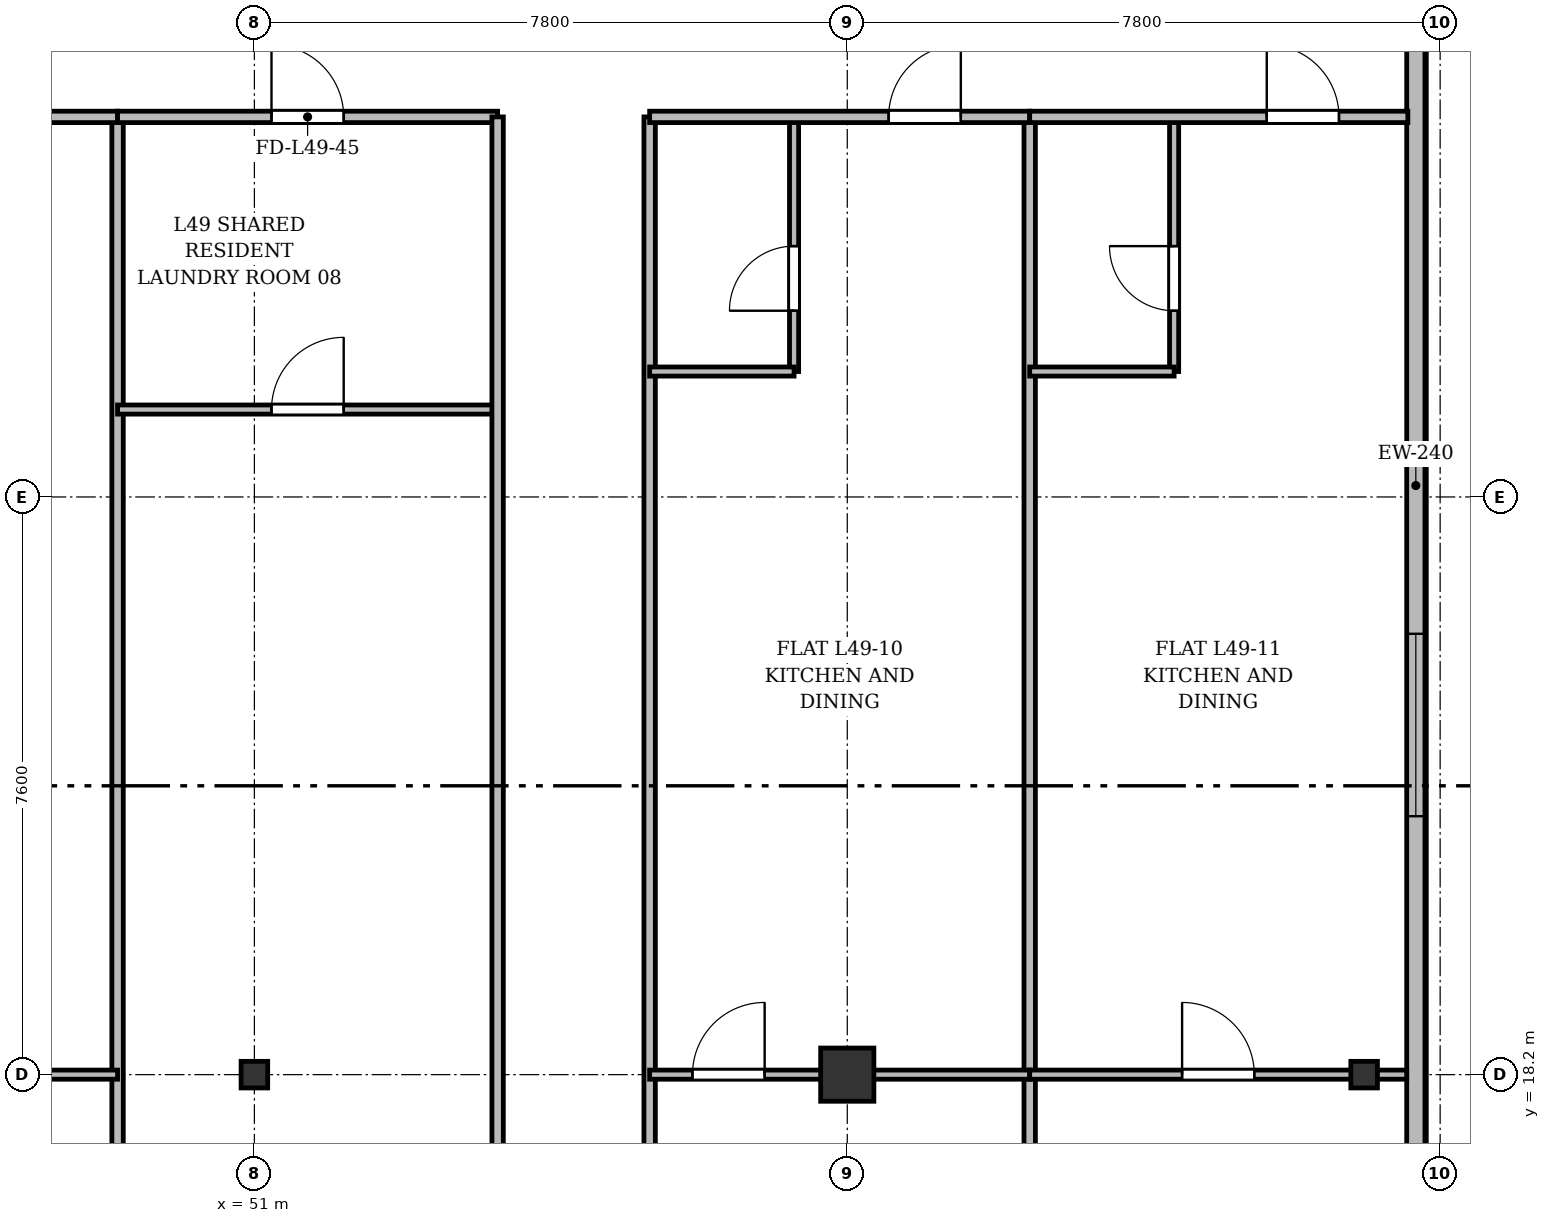
"""IFC4 building model, lengths in metres.
Left out: names, types, materials, properties, quantities, classifications, styles, units other than length and angle.
Written with IfcOpenShell. Run it as: python <this file> out.ifc"""

import sys

from ifc_helpers import new_model, si_unit, direction, frame, frame_2d, origin, origin_2d, place, context, subcontext, project, spatial, rectangle, i_section, extrude, source, transform, mapped, element, fill, save


model = new_model("IFC4")
c1 = context("Model", 3, precision=1e-05, world=origin(), true_north=direction((0.0, 1.0)))
c2 = subcontext(c1, "Body", "Model", "MODEL_VIEW")
j1 = project(units=[si_unit("LENGTHUNIT", "METRE"), si_unit("PLANEANGLEUNIT", "RADIAN")], contexts=[c1])
p1 = place(None, origin())
s1 = spatial("IfcSite", under=j1, at=p1, CompositionType="ELEMENT")
p2 = place(p1, origin())
s2 = spatial("IfcBuilding", under=s1, at=p2, CompositionType="ELEMENT")
p3 = place(p2, frame((0.0, 0.0, 190.5)))
s3 = spatial("IfcBuildingStorey", under=s2, at=p3, CompositionType="ELEMENT", Elevation=190.5)
m1 = source(origin(), c2, "Body", "SweptSolid", [
    extrude(i_section(OverallWidth=0.35, OverallDepth=0.35, WebThickness=0.018, FlangeThickness=0.028, at=origin_2d()), origin(), (0.0, 0.0, 1.0), 3.6),
])
p4 = place(p3, frame((51.0, 18.2, 0.0), z_axis=(0.0, 0.0, 1.0), x_axis=(1.0, 0.0, 0.0)))
e1 = element("IfcColumn", 1, at=p4, inside=s3, PredefinedType="COLUMN", context=c2, shape_type="MappedRepresentation", body=[
    mapped(m1, transform((0.0, 0.0, 0.0), x_axis=(1.0, 0.0, 0.0), y_axis=(0.0, 1.0, 0.0), z_axis=(0.0, 0.0, 1.0), scale=1.0)),
])
m2 = source(origin(), c2, "Body", "SweptSolid", [
    extrude(rectangle(XDim=0.7, YDim=0.7, at=origin_2d()), origin(), (0.0, 0.0, 1.0), 3.6),
])
p5 = place(p3, frame((58.8, 18.2, 0.0), z_axis=(0.0, 0.0, 1.0), x_axis=(1.0, 0.0, 0.0)))
e2 = element("IfcColumn", 2, at=p5, inside=s3, PredefinedType="COLUMN", context=c2, shape_type="MappedRepresentation", body=[
    mapped(m2, transform((0.0, 0.0, 0.0), x_axis=(1.0, 0.0, 0.0), y_axis=(0.0, 1.0, 0.0), z_axis=(0.0, 0.0, 1.0), scale=1.0)),
])
p6 = place(p3, frame((65.6, 18.2, 0.0), z_axis=(0.0, 0.0, 1.0), x_axis=(1.0, 0.0, 0.0)))
e3 = element("IfcColumn", 3, at=p6, inside=s3, PredefinedType="COLUMN", context=c2, shape_type="MappedRepresentation", body=[
    mapped(m1, transform((0.0, 0.0, 0.0), x_axis=(1.0, 0.0, 0.0), y_axis=(0.0, 1.0, 0.0), z_axis=(0.0, 0.0, 1.0), scale=1.0)),
])
p7 = place(p3, frame((66.28, 45.5, 0.0), z_axis=(0.0, 0.0, 1.0), x_axis=(0.0, -1.0, 0.0)))
e4 = element("IfcWall", 4, at=p7, inside=s3, PredefinedType="SOLIDWALL", context=c2, shape_type="SweptSolid", body=[
    extrude(rectangle(XDim=39.1, YDim=0.24, at=frame_2d((19.55, 0.0))), origin(), (0.0, 0.0, 1.0), 3.36),
])
p8 = place(p7, frame((36.45, 0.0, 0.92)))
e5 = element("IfcOpeningElement", 5, at=p8, cuts=e4, PredefinedType="OPENING", context=c2, shape_type="SweptSolid", body=[
    extrude(rectangle(XDim=1.2, YDim=1.65, at=frame_2d((0.6, 0.825))), frame((0.0, 0.13, 0.0), z_axis=(0.0, -1.0, 0.0), x_axis=(1.0, 0.0, 0.0)), (0.0, 0.0, 1.0), 0.26),
])
p9 = place(p7, frame((32.9, 0.0, 0.92)))
e6 = element("IfcOpeningElement", 6, at=p9, cuts=e4, PredefinedType="OPENING", context=c2, shape_type="SweptSolid", body=[
    extrude(rectangle(XDim=2.4, YDim=2.1, at=frame_2d((1.2, 1.05))), frame((0.0, 0.13, 0.0), z_axis=(0.0, -1.0, 0.0), x_axis=(1.0, 0.0, 0.0)), (0.0, 0.0, 1.0), 0.26),
])
p10 = place(p7, frame((28.7, 0.0, 0.92)))
e7 = element("IfcOpeningElement", 7, at=p10, cuts=e4, PredefinedType="OPENING", context=c2, shape_type="SweptSolid", body=[
    extrude(rectangle(XDim=2.4, YDim=2.1, at=frame_2d((1.2, 1.05))), frame((0.0, 0.13, 0.0), z_axis=(0.0, -1.0, 0.0), x_axis=(1.0, 0.0, 0.0)), (0.0, 0.0, 1.0), 0.26),
])
p11 = place(p7, frame((21.5, 0.0, 0.92)))
e8 = element("IfcOpeningElement", 8, at=p11, cuts=e4, PredefinedType="OPENING", context=c2, shape_type="SweptSolid", body=[
    extrude(rectangle(XDim=2.4, YDim=2.1, at=frame_2d((1.2, 1.05))), frame((0.0, 0.13, 0.0), z_axis=(0.0, -1.0, 0.0), x_axis=(1.0, 0.0, 0.0)), (0.0, 0.0, 1.0), 0.26),
])
p12 = place(p7, frame((7.5, 0.0, 0.92)))
e9 = element("IfcOpeningElement", 9, at=p12, cuts=e4, PredefinedType="OPENING", context=c2, shape_type="SweptSolid", body=[
    extrude(rectangle(XDim=2.4, YDim=2.1, at=frame_2d((1.2, 1.05))), frame((0.0, 0.13, 0.0), z_axis=(0.0, -1.0, 0.0), x_axis=(1.0, 0.0, 0.0)), (0.0, 0.0, 1.0), 0.26),
])
p13 = place(p7, frame((4.5, 0.0, 0.92)))
e10 = element("IfcOpeningElement", 10, at=p13, cuts=e4, PredefinedType="OPENING", context=c2, shape_type="SweptSolid", body=[
    extrude(rectangle(XDim=1.2, YDim=1.65, at=frame_2d((0.6, 0.825))), frame((0.0, 0.13, 0.0), z_axis=(0.0, -1.0, 0.0), x_axis=(1.0, 0.0, 0.0)), (0.0, 0.0, 1.0), 0.26),
])
p14 = place(p7, frame((1.15, 0.0, 0.92)))
e11 = element("IfcOpeningElement", 11, at=p14, cuts=e4, PredefinedType="OPENING", context=c2, shape_type="SweptSolid", body=[
    extrude(rectangle(XDim=1.2, YDim=1.65, at=frame_2d((0.6, 0.825))), frame((0.0, 0.13, 0.0), z_axis=(0.0, -1.0, 0.0), x_axis=(1.0, 0.0, 0.0)), (0.0, 0.0, 1.0), 0.26),
])
for number, where, z_axis, x_axis in (
    (12, (49.2, 3.625, 0.0), (0.0, 0.0, 1.0), (0.0, 1.0, 0.0)),
    (13, (61.2, 3.625, 0.0), (0.0, 0.0, 1.0), (0.0, 1.0, 0.0)),
):
    element("IfcWall", number, at=place(p3, frame(where, z_axis=z_axis, x_axis=x_axis)), inside=s3, PredefinedType="PARTITIONING", context=c2, shape_type="SweptSolid", body=[
        extrude(rectangle(XDim=27.175, YDim=0.15, at=frame_2d((13.587, 0.0))), origin(), (0.0, 0.0, 1.0), 2.91),
    ])
p15 = place(p3, frame((44.0, 30.8, 0.0), z_axis=(0.0, 0.0, 1.0), x_axis=(1.0, 0.0, 0.0)))
e14 = element("IfcWall", 14, at=p15, inside=s3, PredefinedType="PARTITIONING", context=c2, shape_type="SweptSolid", body=[
    extrude(rectangle(XDim=5.2, YDim=0.15, at=frame_2d((2.6, 0.0))), origin(), (0.0, 0.0, 1.0), 3.36),
])
p16 = place(p15, frame((2.033, 0.0, 0.0)))
e15 = element("IfcOpeningElement", 15, at=p16, cuts=e14, PredefinedType="OPENING", context=c2, shape_type="SweptSolid", body=[
    extrude(rectangle(XDim=0.95, YDim=2.15, at=frame_2d((0.475, 1.075))), frame((0.0, 0.085, 0.0), z_axis=(0.0, -1.0, 0.0), x_axis=(1.0, 0.0, 0.0)), (0.0, 0.0, 1.0), 0.17),
])
p17 = place(p3, frame((44.025, 18.2, 0.0), z_axis=(0.0, 0.0, 1.0), x_axis=(1.0, 0.0, 0.0)))
e16 = element("IfcWall", 16, at=p17, inside=s3, PredefinedType="PARTITIONING", context=c2, shape_type="SweptSolid", body=[
    extrude(rectangle(XDim=5.175, YDim=0.12, at=frame_2d((2.587, 0.0))), origin(), (0.0, 0.0, 1.0), 2.91),
])
p18 = place(p17, frame((2.021, 0.0, 0.0)))
e17 = element("IfcOpeningElement", 17, at=p18, cuts=e16, PredefinedType="OPENING", context=c2, shape_type="SweptSolid", body=[
    extrude(rectangle(XDim=0.95, YDim=2.15, at=frame_2d((0.475, 1.075))), frame((0.0, 0.07, 0.0), z_axis=(0.0, -1.0, 0.0), x_axis=(1.0, 0.0, 0.0)), (0.0, 0.0, 1.0), 0.14),
])
p19 = place(p3, frame((49.2, 30.8, 0.0), z_axis=(0.0, 0.0, 1.0), x_axis=(1.0, 0.0, 0.0)))
e18 = element("IfcWall", 18, at=p19, inside=s3, PredefinedType="PARTITIONING", context=c2, shape_type="SweptSolid", body=[
    extrude(rectangle(XDim=5.0, YDim=0.15, at=frame_2d((2.5, 0.0))), origin(), (0.0, 0.0, 1.0), 2.86),
])
p20 = place(p19, frame((2.025, 0.0, 0.0)))
e19 = element("IfcOpeningElement", 19, at=p20, cuts=e18, PredefinedType="OPENING", context=c2, shape_type="SweptSolid", body=[
    extrude(rectangle(XDim=0.95, YDim=2.15, at=frame_2d((0.475, 1.075))), frame((0.0, 0.085, 0.0), z_axis=(0.0, -1.0, 0.0), x_axis=(1.0, 0.0, 0.0)), (0.0, 0.0, 1.0), 0.17),
])
p21 = place(p3, frame((49.2, 26.95, 0.0), z_axis=(0.0, 0.0, 1.0), x_axis=(1.0, 0.0, 0.0)))
e20 = element("IfcWall", 20, at=p21, inside=s3, PredefinedType="PARTITIONING", context=c2, shape_type="SweptSolid", body=[
    extrude(rectangle(XDim=5.0, YDim=0.12, at=frame_2d((2.5, 0.0))), origin(), (0.0, 0.0, 1.0), 2.86),
])
p22 = place(p21, frame((2.025, 0.0, 0.0)))
e21 = element("IfcOpeningElement", 21, at=p22, cuts=e20, PredefinedType="OPENING", context=c2, shape_type="SweptSolid", body=[
    extrude(rectangle(XDim=0.95, YDim=2.15, at=frame_2d((0.475, 1.075))), frame((0.0, 0.07, 0.0), z_axis=(0.0, -1.0, 0.0), x_axis=(1.0, 0.0, 0.0)), (0.0, 0.0, 1.0), 0.14),
])
for number, where, z_axis, x_axis in (
    (22, (54.2, 3.625, 0.0), (0.0, 0.0, 1.0), (0.0, 1.0, 0.0)),
    (23, (56.2, 3.625, 0.0), (0.0, 0.0, 1.0), (0.0, 1.0, 0.0)),
):
    element("IfcWall", number, at=place(p3, frame(where, z_axis=z_axis, x_axis=x_axis)), inside=s3, PredefinedType="PARTITIONING", context=c2, shape_type="SweptSolid", body=[
        extrude(rectangle(XDim=27.175, YDim=0.15, at=frame_2d((13.587, 0.0))), origin(), (0.0, 0.0, 1.0), 2.91),
    ])
p23 = place(p3, frame((56.2, 18.2, 0.0), z_axis=(0.0, 0.0, 1.0), x_axis=(1.0, 0.0, 0.0)))
e24 = element("IfcWall", 24, at=p23, inside=s3, PredefinedType="PARTITIONING", context=c2, shape_type="SweptSolid", body=[
    extrude(rectangle(XDim=5.0, YDim=0.12, at=frame_2d((2.5, 0.0))), origin(), (0.0, 0.0, 1.0), 2.91),
])
p24 = place(p23, frame((0.563, 0.0, 0.0)))
e25 = element("IfcOpeningElement", 25, at=p24, cuts=e24, PredefinedType="OPENING", context=c2, shape_type="SweptSolid", body=[
    extrude(rectangle(XDim=0.95, YDim=2.15, at=frame_2d((0.475, 1.075))), frame((0.0, 0.07, 0.0), z_axis=(0.0, -1.0, 0.0), x_axis=(1.0, 0.0, 0.0)), (0.0, 0.0, 1.0), 0.14),
])
p25 = place(p3, frame((58.1, 27.45, 0.0), z_axis=(0.0, 0.0, 1.0), x_axis=(0.0, 1.0, 0.0)))
e26 = element("IfcWall", 26, at=p25, inside=s3, PredefinedType="PARTITIONING", context=c2, shape_type="SweptSolid", body=[
    extrude(rectangle(XDim=3.35, YDim=0.12, at=frame_2d((1.675, 0.0))), origin(), (0.0, 0.0, 1.0), 3.36),
])
p26 = place(p25, frame((0.8, 0.0, 0.0)))
e27 = element("IfcOpeningElement", 27, at=p26, cuts=e26, PredefinedType="OPENING", context=c2, shape_type="SweptSolid", body=[
    extrude(rectangle(XDim=0.85, YDim=2.1, at=frame_2d((0.425, 1.05))), frame((0.0, 0.07, 0.0), z_axis=(0.0, -1.0, 0.0), x_axis=(1.0, 0.0, 0.0)), (0.0, 0.0, 1.0), 0.14),
])
p27 = place(p3, frame((56.2, 27.45, 0.0), z_axis=(0.0, 0.0, 1.0), x_axis=(1.0, 0.0, 0.0)))
e28 = element("IfcWall", 28, at=p27, inside=s3, PredefinedType="PARTITIONING", context=c2, shape_type="SweptSolid", body=[
    extrude(rectangle(XDim=1.9, YDim=0.12, at=frame_2d((0.95, 0.0))), origin(), (0.0, 0.0, 1.0), 3.36),
])
p28 = place(p3, frame((56.2, 30.8, 0.0), z_axis=(0.0, 0.0, 1.0), x_axis=(1.0, 0.0, 0.0)))
e29 = element("IfcWall", 29, at=p28, inside=s3, PredefinedType="PARTITIONING", context=c2, shape_type="SweptSolid", body=[
    extrude(rectangle(XDim=5.0, YDim=0.15, at=frame_2d((2.5, 0.0))), origin(), (0.0, 0.0, 1.0), 2.86),
])
p29 = place(p28, frame((3.144, 0.0, 0.0)))
e30 = element("IfcOpeningElement", 30, at=p29, cuts=e29, PredefinedType="OPENING", context=c2, shape_type="SweptSolid", body=[
    extrude(rectangle(XDim=0.95, YDim=2.15, at=frame_2d((0.475, 1.075))), frame((0.0, 0.085, 0.0), z_axis=(0.0, -1.0, 0.0), x_axis=(1.0, 0.0, 0.0)), (0.0, 0.0, 1.0), 0.17),
])
p30 = place(p3, frame((61.2, 18.2, 0.0), z_axis=(0.0, 0.0, 1.0), x_axis=(1.0, 0.0, 0.0)))
e31 = element("IfcWall", 31, at=p30, inside=s3, PredefinedType="PARTITIONING", context=c2, shape_type="SweptSolid", body=[
    extrude(rectangle(XDim=4.96, YDim=0.12, at=frame_2d((2.48, 0.0))), origin(), (0.0, 0.0, 1.0), 2.91),
])
p31 = place(p30, frame((2.005, 0.0, 0.0)))
e32 = element("IfcOpeningElement", 32, at=p31, cuts=e31, PredefinedType="OPENING", context=c2, shape_type="SweptSolid", body=[
    extrude(rectangle(XDim=0.95, YDim=2.15, at=frame_2d((0.475, 1.075))), frame((0.0, 0.07, 0.0), z_axis=(0.0, -1.0, 0.0), x_axis=(1.0, 0.0, 0.0)), (0.0, 0.0, 1.0), 0.14),
])
p32 = place(p3, frame((63.1, 27.45, 0.0), z_axis=(0.0, 0.0, 1.0), x_axis=(0.0, 1.0, 0.0)))
e33 = element("IfcWall", 33, at=p32, inside=s3, PredefinedType="PARTITIONING", context=c2, shape_type="SweptSolid", body=[
    extrude(rectangle(XDim=3.35, YDim=0.12, at=frame_2d((1.675, 0.0))), origin(), (0.0, 0.0, 1.0), 3.36),
])
p33 = place(p32, frame((0.8, 0.0, 0.0)))
e34 = element("IfcOpeningElement", 34, at=p33, cuts=e33, PredefinedType="OPENING", context=c2, shape_type="SweptSolid", body=[
    extrude(rectangle(XDim=0.85, YDim=2.1, at=frame_2d((0.425, 1.05))), frame((0.0, 0.07, 0.0), z_axis=(0.0, -1.0, 0.0), x_axis=(1.0, 0.0, 0.0)), (0.0, 0.0, 1.0), 0.14),
])
p34 = place(p3, frame((61.2, 27.45, 0.0), z_axis=(0.0, 0.0, 1.0), x_axis=(1.0, 0.0, 0.0)))
e35 = element("IfcWall", 35, at=p34, inside=s3, PredefinedType="PARTITIONING", context=c2, shape_type="SweptSolid", body=[
    extrude(rectangle(XDim=1.9, YDim=0.12, at=frame_2d((0.95, 0.0))), origin(), (0.0, 0.0, 1.0), 3.36),
])
p35 = place(p3, frame((61.2, 30.8, 0.0), z_axis=(0.0, 0.0, 1.0), x_axis=(1.0, 0.0, 0.0)))
e36 = element("IfcWall", 36, at=p35, inside=s3, PredefinedType="PARTITIONING", context=c2, shape_type="SweptSolid", body=[
    extrude(rectangle(XDim=4.975, YDim=0.15, at=frame_2d((2.488, 0.0))), origin(), (0.0, 0.0, 1.0), 2.86),
])
p36 = place(p35, frame((3.119, 0.0, 0.0)))
e37 = element("IfcOpeningElement", 37, at=p36, cuts=e36, PredefinedType="OPENING", context=c2, shape_type="SweptSolid", body=[
    extrude(rectangle(XDim=0.95, YDim=2.15, at=frame_2d((0.475, 1.075))), frame((0.0, 0.085, 0.0), z_axis=(0.0, -1.0, 0.0), x_axis=(1.0, 0.0, 0.0)), (0.0, 0.0, 1.0), 0.17),
])
m3 = source(origin(), c2, "Body", "SweptSolid", [
    extrude(rectangle(XDim=2.4, YDim=2.1, at=frame_2d((1.2, 1.05))), frame((0.0, 0.03, 0.0), z_axis=(0.0, -1.0, 0.0), x_axis=(1.0, 0.0, 0.0)), (0.0, 0.0, 1.0), 0.06),
])
p37 = place(p11, origin())
e38 = element("IfcWindow", 38, at=p37, inside=s3, PartitioningType="SINGLE_PANEL", PredefinedType="WINDOW", context=c2, shape_type="MappedRepresentation", body=[
    mapped(m3, transform((0.0, 0.0, 0.0), x_axis=(1.0, 0.0, 0.0), y_axis=(0.0, 1.0, 0.0), z_axis=(0.0, 0.0, 1.0), scale=1.0)),
])
fill(e8, e38)
m4 = source(origin(), c2, "Body", "SweptSolid", [
    extrude(rectangle(XDim=0.95, YDim=2.15, at=frame_2d((0.475, 1.075))), frame((0.0, 0.025, 0.0), z_axis=(0.0, -1.0, 0.0), x_axis=(1.0, 0.0, 0.0)), (0.0, 0.0, 1.0), 0.05),
])
p38 = place(p20, origin())
e39 = element("IfcDoor", 39, at=p38, inside=s3, OperationType="SINGLE_SWING_LEFT", PredefinedType="DOOR", context=c2, shape_type="MappedRepresentation", body=[
    mapped(m4, transform((0.0, 0.0, 0.0), x_axis=(1.0, 0.0, 0.0), y_axis=(0.0, 1.0, 0.0), z_axis=(0.0, 0.0, 1.0), scale=1.0)),
])
fill(e19, e39)
p39 = place(p22, origin())
e40 = element("IfcDoor", 40, at=p39, inside=s3, OperationType="SINGLE_SWING_RIGHT", PredefinedType="DOOR", context=c2, shape_type="MappedRepresentation", body=[
    mapped(m4, transform((0.0, 0.0, 0.0), x_axis=(1.0, 0.0, 0.0), y_axis=(0.0, 1.0, 0.0), z_axis=(0.0, 0.0, 1.0), scale=1.0)),
])
fill(e21, e40)
p40 = place(p24, origin())
e41 = element("IfcDoor", 41, at=p40, inside=s3, OperationType="SINGLE_SWING_RIGHT", PredefinedType="DOOR", context=c2, shape_type="MappedRepresentation", body=[
    mapped(m4, transform((0.0, 0.0, 0.0), x_axis=(1.0, 0.0, 0.0), y_axis=(0.0, 1.0, 0.0), z_axis=(0.0, 0.0, 1.0), scale=1.0)),
])
fill(e25, e41)
m5 = source(origin(), c2, "Body", "SweptSolid", [
    extrude(rectangle(XDim=0.85, YDim=2.1, at=frame_2d((0.425, 1.05))), frame((0.0, 0.025, 0.0), z_axis=(0.0, -1.0, 0.0), x_axis=(1.0, 0.0, 0.0)), (0.0, 0.0, 1.0), 0.05),
])
p41 = place(p26, origin())
e42 = element("IfcDoor", 42, at=p41, inside=s3, OperationType="SINGLE_SWING_LEFT", PredefinedType="DOOR", context=c2, shape_type="MappedRepresentation", body=[
    mapped(m5, transform((0.0, 0.0, 0.0), x_axis=(1.0, 0.0, 0.0), y_axis=(0.0, 1.0, 0.0), z_axis=(0.0, 0.0, 1.0), scale=1.0)),
])
fill(e27, e42)
p42 = place(p29, origin())
e43 = element("IfcDoor", 43, at=p42, inside=s3, OperationType="SINGLE_SWING_RIGHT", PredefinedType="DOOR", context=c2, shape_type="MappedRepresentation", body=[
    mapped(m4, transform((0.0, 0.0, 0.0), x_axis=(1.0, 0.0, 0.0), y_axis=(0.0, 1.0, 0.0), z_axis=(0.0, 0.0, 1.0), scale=1.0)),
])
fill(e30, e43)
p43 = place(p31, origin())
e44 = element("IfcDoor", 44, at=p43, inside=s3, OperationType="SINGLE_SWING_LEFT", PredefinedType="DOOR", context=c2, shape_type="MappedRepresentation", body=[
    mapped(m4, transform((0.0, 0.0, 0.0), x_axis=(1.0, 0.0, 0.0), y_axis=(0.0, 1.0, 0.0), z_axis=(0.0, 0.0, 1.0), scale=1.0)),
])
fill(e32, e44)
p44 = place(p33, origin())
e45 = element("IfcDoor", 45, at=p44, inside=s3, OperationType="SINGLE_SWING_RIGHT", PredefinedType="DOOR", context=c2, shape_type="MappedRepresentation", body=[
    mapped(m5, transform((0.0, 0.0, 0.0), x_axis=(1.0, 0.0, 0.0), y_axis=(0.0, 1.0, 0.0), z_axis=(0.0, 0.0, 1.0), scale=1.0)),
])
fill(e34, e45)
p45 = place(p36, origin())
e46 = element("IfcDoor", 46, at=p45, inside=s3, OperationType="SINGLE_SWING_LEFT", PredefinedType="DOOR", context=c2, shape_type="MappedRepresentation", body=[
    mapped(m4, transform((0.0, 0.0, 0.0), x_axis=(1.0, 0.0, 0.0), y_axis=(0.0, 1.0, 0.0), z_axis=(0.0, 0.0, 1.0), scale=1.0)),
])
fill(e37, e46)
save(model, sys.argv[1])
